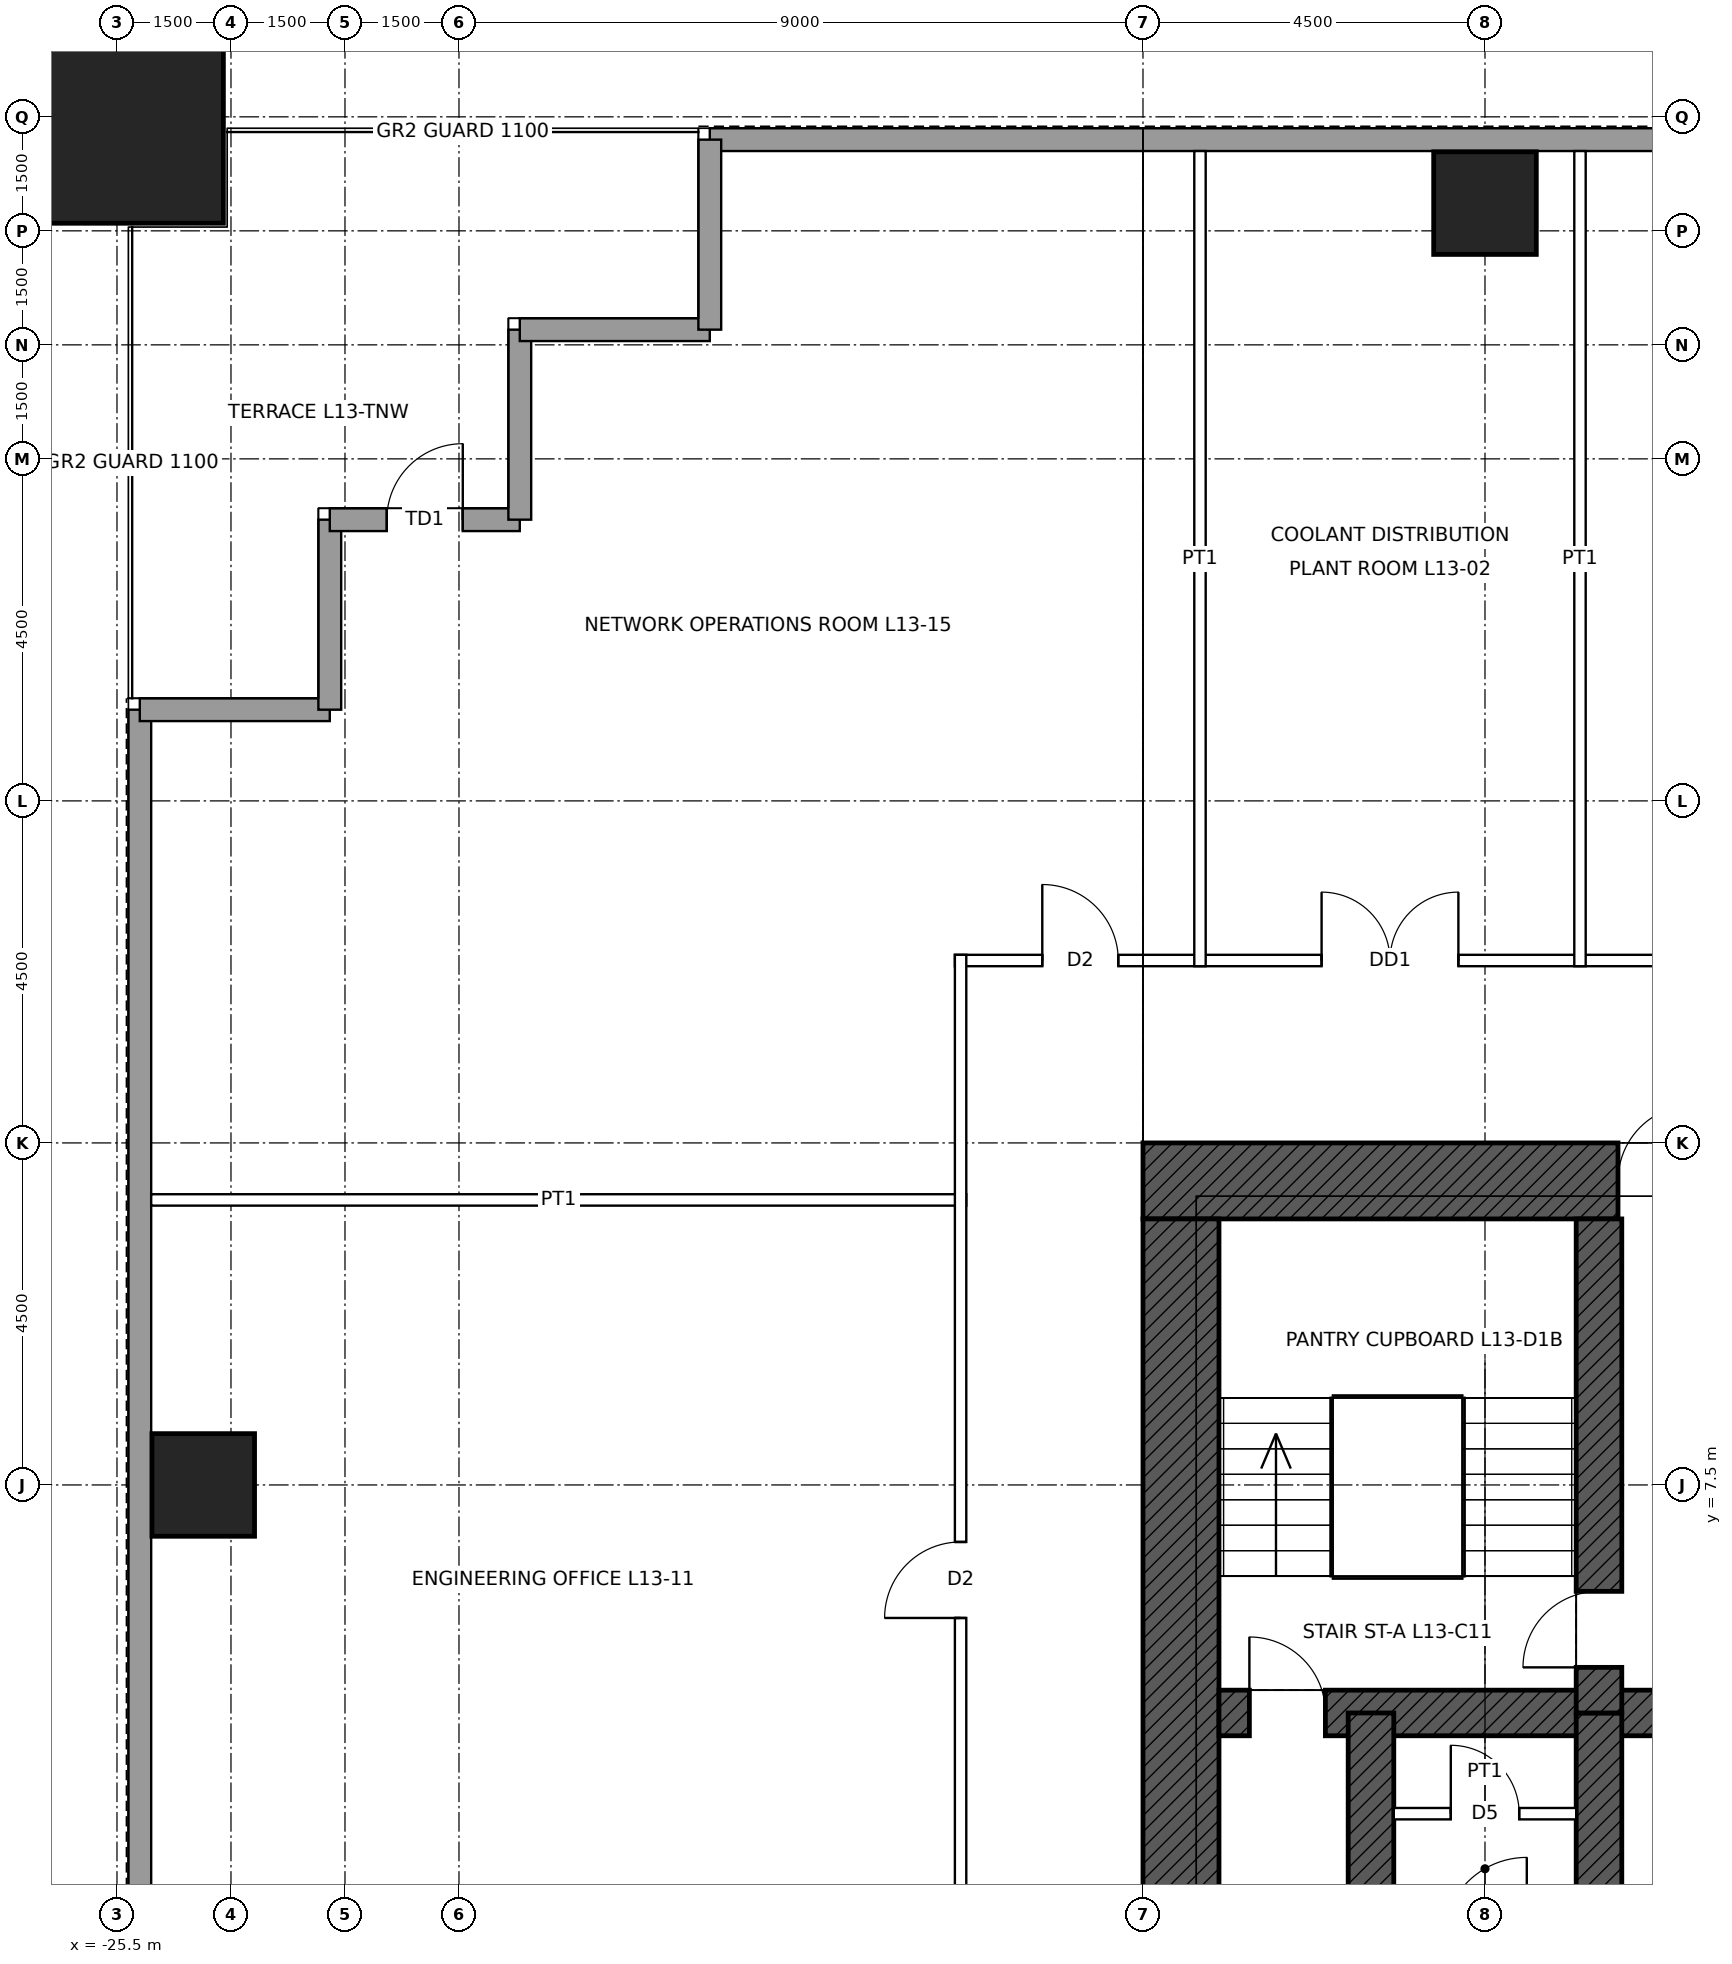
"""IFC4 building model, lengths in metres.
Left out: names, types, materials, properties, quantities, classifications, styles, units other than length and angle.
Written with IfcOpenShell. Run it as: python <this file> out.ifc"""

import sys

from ifc_helpers import new_model, si_unit, direction, frame, frame_2d, origin, origin_2d, place, context, subcontext, project, spatial, rectangle, hollow_rectangle, extrude, element, fill, save


model = new_model("IFC4")
c1 = context("Model", 3, precision=1e-05, world=origin(), true_north=direction((0.0, 1.0)))
c2 = subcontext(c1, "Body", "Model", "MODEL_VIEW")
j1 = project(units=[si_unit("LENGTHUNIT", "METRE"), si_unit("PLANEANGLEUNIT", "RADIAN")], contexts=[c1])
p1 = place(None, origin())
s1 = spatial("IfcSite", under=j1, at=p1, CompositionType="ELEMENT")
p2 = place(p1, origin())
s2 = spatial("IfcBuilding", under=s1, at=p2, CompositionType="ELEMENT")
p3 = place(p2, frame((0.0, 0.0, 68.4)))
s3 = spatial("IfcBuildingStorey", under=s2, at=p3, CompositionType="ELEMENT", Elevation=68.4)
p4 = place(p3, frame((-25.5, 25.5, 0.0), z_axis=(0.0, 0.0, 1.0), x_axis=(1.0, 0.0, 0.0)))
e1 = element("IfcColumn", 1, at=p4, inside=s3, PredefinedType="COLUMN", context=c2, shape_type="SweptSolid", body=[
    extrude(hollow_rectangle(XDim=2.8, YDim=2.8, WallThickness=0.14, at=origin_2d()), origin(), (0.0, 0.0, 1.0), 5.0),
])
for number, where, z_axis, x_axis in (
    (2, (-7.5, 24.365, 0.0), (0.0, 0.0, 1.0), (1.0, 0.0, 0.0)),
    (3, (-24.365, 7.5, 0.0), (0.0, 0.0, 1.0), (1.0, 0.0, 0.0)),
):
    element("IfcColumn", number, at=place(p3, frame(where, z_axis=z_axis, x_axis=x_axis)), inside=s3, PredefinedType="COLUMN", context=c2, shape_type="SweptSolid", body=[
        extrude(hollow_rectangle(XDim=1.35, YDim=1.35, WallThickness=0.085, at=origin_2d()), origin(), (0.0, 0.0, 1.0), 5.0),
    ])
p5 = place(p3, frame((-12.0, 11.5, 0.0), z_axis=(0.0, 0.0, 1.0), x_axis=(1.0, 0.0, 0.0)))
e4 = element("IfcWall", 4, at=p5, inside=s3, PredefinedType="SHEAR", context=c2, shape_type="SweptSolid", body=[
    extrude(rectangle(XDim=24.0, YDim=1.0, at=frame_2d((12.0, 0.0))), origin(), (0.0, 0.0, 1.0), 5.0),
])
p6 = place(p5, frame((6.25, 0.0, 0.0)))
e5 = element("IfcOpeningElement", 5, at=p6, cuts=e4, PredefinedType="OPENING", context=c2, shape_type="SweptSolid", body=[
    extrude(rectangle(XDim=1.0, YDim=2.4, at=frame_2d((0.5, 1.2))), frame((0.0, 0.51, 0.0), z_axis=(0.0, -1.0, 0.0), x_axis=(1.0, 0.0, 0.0)), (0.0, 0.0, 1.0), 1.02),
])
p7 = place(p5, frame((16.75, 0.0, 0.0)))
e6 = element("IfcOpeningElement", 6, at=p7, cuts=e4, PredefinedType="OPENING", context=c2, shape_type="SweptSolid", body=[
    extrude(rectangle(XDim=1.0, YDim=2.4, at=frame_2d((0.5, 1.2))), frame((0.0, 0.51, 0.0), z_axis=(0.0, -1.0, 0.0), x_axis=(1.0, 0.0, 0.0)), (0.0, 0.0, 1.0), 1.02),
])
p8 = place(p3, frame((-11.5, -11.0, 0.0), z_axis=(0.0, 0.0, 1.0), x_axis=(0.0, 1.0, 0.0)))
e7 = element("IfcWall", 7, at=p8, inside=s3, PredefinedType="SHEAR", context=c2, shape_type="SweptSolid", body=[
    extrude(rectangle(XDim=22.0, YDim=1.0, at=frame_2d((11.0, 0.0))), origin(), (0.0, 0.0, 1.0), 5.0),
])
p9 = place(p8, frame((10.5, 0.0, 0.0)))
e8 = element("IfcOpeningElement", 8, at=p9, cuts=e7, PredefinedType="OPENING", context=c2, shape_type="SweptSolid", body=[
    extrude(rectangle(XDim=1.0, YDim=2.4, at=frame_2d((0.5, 1.2))), frame((0.0, 0.51, 0.0), z_axis=(0.0, -1.0, 0.0), x_axis=(1.0, 0.0, 0.0)), (0.0, 0.0, 1.0), 1.02),
])
p10 = place(p3, frame((-11.0, 4.5, 0.0), z_axis=(0.0, 0.0, 1.0), x_axis=(1.0, 0.0, 0.0)))
e9 = element("IfcWall", 9, at=p10, inside=s3, PredefinedType="SHEAR", context=c2, shape_type="SweptSolid", body=[
    extrude(rectangle(XDim=22.0, YDim=0.6, at=frame_2d((11.0, 0.0))), origin(), (0.0, 0.0, 1.0), 5.0),
])
p11 = place(p10, frame((0.4, 0.0, 0.0)))
e10 = element("IfcOpeningElement", 10, at=p11, cuts=e9, PredefinedType="OPENING", context=c2, shape_type="SweptSolid", body=[
    extrude(rectangle(XDim=1.0, YDim=2.1, at=frame_2d((0.5, 1.05))), frame((0.0, 0.31, 0.0), z_axis=(0.0, -1.0, 0.0), x_axis=(1.0, 0.0, 0.0)), (0.0, 0.0, 1.0), 0.62),
])
p12 = place(p10, frame((20.6, 0.0, 0.0)))
e11 = element("IfcOpeningElement", 11, at=p12, cuts=e9, PredefinedType="OPENING", context=c2, shape_type="SweptSolid", body=[
    extrude(rectangle(XDim=1.0, YDim=2.1, at=frame_2d((0.5, 1.05))), frame((0.0, 0.31, 0.0), z_axis=(0.0, -1.0, 0.0), x_axis=(1.0, 0.0, 0.0)), (0.0, 0.0, 1.0), 0.62),
])
for number, where, z_axis, x_axis in (
    (12, (-9.0, 1.5, 0.0), (0.0, 0.0, 1.0), (0.0, 1.0, 0.0)),
    (13, (-6.0, 1.5, 0.0), (0.0, 0.0, 1.0), (0.0, 1.0, 0.0)),
):
    element("IfcWall", number, at=place(p3, frame(where, z_axis=z_axis, x_axis=x_axis)), inside=s3, PredefinedType="SHEAR", context=c2, shape_type="SweptSolid", body=[
        extrude(rectangle(XDim=3.0, YDim=0.6, at=frame_2d((1.5, 0.0))), origin(), (0.0, 0.0, 1.0), 5.0),
    ])
p13 = place(p3, frame((-6.0, 4.5, 0.0), z_axis=(0.0, 0.0, 1.0), x_axis=(0.0, 1.0, 0.0)))
e14 = element("IfcWall", 14, at=p13, inside=s3, PredefinedType="SHEAR", context=c2, shape_type="SweptSolid", body=[
    extrude(rectangle(XDim=6.5, YDim=0.6, at=frame_2d((3.25, 0.0))), origin(), (0.0, 0.0, 1.0), 5.0),
])
p14 = place(p13, frame((0.6, 0.0, 0.0)))
e15 = element("IfcOpeningElement", 15, at=p14, cuts=e14, PredefinedType="OPENING", context=c2, shape_type="SweptSolid", body=[
    extrude(rectangle(XDim=1.0, YDim=2.1, at=frame_2d((0.5, 1.05))), frame((0.0, 0.31, 0.0), z_axis=(0.0, -1.0, 0.0), x_axis=(1.0, 0.0, 0.0)), (0.0, 0.0, 1.0), 0.62),
])
for number, where, z_axis, x_axis in (
    (16, (-17.7, 25.2, 0.0), (0.0, 0.0, 1.0), (1.0, 0.0, 0.0)),
    (17, (-25.2, -17.7, 0.0), (0.0, 0.0, 1.0), (0.0, 1.0, 0.0)),
):
    element("IfcWall", number, at=place(p3, frame(where, z_axis=z_axis, x_axis=x_axis)), inside=s3, PredefinedType="SOLIDWALL", context=c2, shape_type="SweptSolid", body=[
        extrude(rectangle(XDim=35.4, YDim=0.3, at=frame_2d((17.7, 0.0))), origin(), (0.0, 0.0, 1.0), 4.8),
    ])
for number, where, z_axis, x_axis in (
    (18, (-25.2, 17.7, 0.0), (0.0, 0.0, 1.0), (1.0, 0.0, 0.0)),
    (19, (-22.7, 17.7, 0.0), (0.0, 0.0, 1.0), (0.0, 1.0, 0.0)),
):
    element("IfcWall", number, at=place(p3, frame(where, z_axis=z_axis, x_axis=x_axis)), inside=s3, PredefinedType="SOLIDWALL", context=c2, shape_type="SweptSolid", body=[
        extrude(rectangle(XDim=2.5, YDim=0.3, at=frame_2d((1.25, 0.0))), origin(), (0.0, 0.0, 1.0), 4.8),
    ])
p15 = place(p3, frame((-22.7, 20.2, 0.0), z_axis=(0.0, 0.0, 1.0), x_axis=(1.0, 0.0, 0.0)))
e20 = element("IfcWall", 20, at=p15, inside=s3, PredefinedType="SOLIDWALL", context=c2, shape_type="SweptSolid", body=[
    extrude(rectangle(XDim=2.5, YDim=0.3, at=frame_2d((1.25, 0.0))), origin(), (0.0, 0.0, 1.0), 4.8),
])
p16 = place(p15, frame((0.75, 0.0, 0.0)))
e21 = element("IfcOpeningElement", 21, at=p16, cuts=e20, PredefinedType="OPENING", context=c2, shape_type="SweptSolid", body=[
    extrude(rectangle(XDim=1.0, YDim=2.4, at=frame_2d((0.5, 1.2))), frame((0.0, 0.16, 0.0), z_axis=(0.0, -1.0, 0.0), x_axis=(1.0, 0.0, 0.0)), (0.0, 0.0, 1.0), 0.32),
])
for number, where, z_axis, x_axis in (
    (22, (-20.2, 20.2, 0.0), (0.0, 0.0, 1.0), (0.0, 1.0, 0.0)),
    (23, (-20.2, 22.7, 0.0), (0.0, 0.0, 1.0), (1.0, 0.0, 0.0)),
    (24, (-17.7, 22.7, 0.0), (0.0, 0.0, 1.0), (0.0, 1.0, 0.0)),
):
    element("IfcWall", number, at=place(p3, frame(where, z_axis=z_axis, x_axis=x_axis)), inside=s3, PredefinedType="SOLIDWALL", context=c2, shape_type="SweptSolid", body=[
        extrude(rectangle(XDim=2.5, YDim=0.3, at=frame_2d((1.25, 0.0))), origin(), (0.0, 0.0, 1.0), 4.8),
    ])
p17 = place(p3, frame((-25.05, 11.25, 0.0), z_axis=(0.0, 0.0, 1.0), x_axis=(1.0, 0.0, 0.0)))
e25 = element("IfcWall", 25, at=p17, inside=s3, PredefinedType="PARTITIONING", context=c2, shape_type="SweptSolid", body=[
    extrude(rectangle(XDim=10.725, YDim=0.15, at=frame_2d((5.363, 0.0))), origin(), (0.0, 0.0, 1.0), 3.853),
])
p18 = place(p3, frame((-14.475, 14.4, 0.0), z_axis=(0.0, 0.0, 1.0), x_axis=(1.0, 0.0, 0.0)))
e26 = element("IfcWall", 26, at=p18, inside=s3, PredefinedType="PARTITIONING", context=c2, shape_type="SweptSolid", body=[
    extrude(rectangle(XDim=28.95, YDim=0.15, at=frame_2d((14.475, 0.0))), origin(), (0.0, 0.0, 1.0), 4.8),
])
p19 = place(p18, frame((4.825, 0.0, 0.0)))
e27 = element("IfcOpeningElement", 27, at=p19, cuts=e26, PredefinedType="OPENING", context=c2, shape_type="SweptSolid", body=[
    extrude(rectangle(XDim=1.8, YDim=2.4, at=frame_2d((0.9, 1.2))), frame((0.0, 0.085, 0.0), z_axis=(0.0, -1.0, 0.0), x_axis=(1.0, 0.0, 0.0)), (0.0, 0.0, 1.0), 0.17),
])
p20 = place(p18, frame((13.575, 0.0, 0.0)))
e28 = element("IfcOpeningElement", 28, at=p20, cuts=e26, PredefinedType="OPENING", context=c2, shape_type="SweptSolid", body=[
    extrude(rectangle(XDim=1.8, YDim=2.4, at=frame_2d((0.9, 1.2))), frame((0.0, 0.085, 0.0), z_axis=(0.0, -1.0, 0.0), x_axis=(1.0, 0.0, 0.0)), (0.0, 0.0, 1.0), 0.17),
])
p21 = place(p18, frame((22.725, 0.0, 0.0)))
e29 = element("IfcOpeningElement", 29, at=p21, cuts=e26, PredefinedType="OPENING", context=c2, shape_type="SweptSolid", body=[
    extrude(rectangle(XDim=1.0, YDim=2.1, at=frame_2d((0.5, 1.05))), frame((0.0, 0.085, 0.0), z_axis=(0.0, -1.0, 0.0), x_axis=(1.0, 0.0, 0.0)), (0.0, 0.0, 1.0), 0.17),
])
p22 = place(p18, frame((26.8, 0.0, 0.0)))
e30 = element("IfcOpeningElement", 30, at=p22, cuts=e26, PredefinedType="OPENING", context=c2, shape_type="SweptSolid", body=[
    extrude(rectangle(XDim=1.0, YDim=2.1, at=frame_2d((0.5, 1.05))), frame((0.0, 0.085, 0.0), z_axis=(0.0, -1.0, 0.0), x_axis=(1.0, 0.0, 0.0)), (0.0, 0.0, 1.0), 0.17),
])
p23 = place(p18, frame((1.15, 0.0, 0.0)))
e31 = element("IfcOpeningElement", 31, at=p23, cuts=e26, PredefinedType="OPENING", context=c2, shape_type="SweptSolid", body=[
    extrude(rectangle(XDim=1.0, YDim=2.1, at=frame_2d((0.5, 1.05))), frame((0.0, 0.085, 0.0), z_axis=(0.0, -1.0, 0.0), x_axis=(1.0, 0.0, 0.0)), (0.0, 0.0, 1.0), 0.17),
])
p24 = place(p3, frame((-14.4, -14.475, 0.0), z_axis=(0.0, 0.0, 1.0), x_axis=(0.0, 1.0, 0.0)))
e32 = element("IfcWall", 32, at=p24, inside=s3, PredefinedType="PARTITIONING", context=c2, shape_type="SweptSolid", body=[
    extrude(rectangle(XDim=28.95, YDim=0.15, at=frame_2d((14.475, 0.0))), origin(), (0.0, 0.0, 1.0), 4.8),
])
p25 = place(p24, frame((4.825, 0.0, 0.0)))
e33 = element("IfcOpeningElement", 33, at=p25, cuts=e32, PredefinedType="OPENING", context=c2, shape_type="SweptSolid", body=[
    extrude(rectangle(XDim=1.8, YDim=2.4, at=frame_2d((0.9, 1.2))), frame((0.0, 0.085, 0.0), z_axis=(0.0, -1.0, 0.0), x_axis=(1.0, 0.0, 0.0)), (0.0, 0.0, 1.0), 0.17),
])
p26 = place(p24, frame((11.075, 0.0, 0.0)))
e34 = element("IfcOpeningElement", 34, at=p26, cuts=e32, PredefinedType="OPENING", context=c2, shape_type="SweptSolid", body=[
    extrude(rectangle(XDim=1.8, YDim=2.4, at=frame_2d((0.9, 1.2))), frame((0.0, 0.085, 0.0), z_axis=(0.0, -1.0, 0.0), x_axis=(1.0, 0.0, 0.0)), (0.0, 0.0, 1.0), 0.17),
])
p27 = place(p24, frame((20.225, 0.0, 0.0)))
e35 = element("IfcOpeningElement", 35, at=p27, cuts=e32, PredefinedType="OPENING", context=c2, shape_type="SweptSolid", body=[
    extrude(rectangle(XDim=1.0, YDim=2.1, at=frame_2d((0.5, 1.05))), frame((0.0, 0.085, 0.0), z_axis=(0.0, -1.0, 0.0), x_axis=(1.0, 0.0, 0.0)), (0.0, 0.0, 1.0), 0.17),
])
p28 = place(p3, frame((-11.25, 14.325, 0.0), z_axis=(0.0, 0.0, 1.0), x_axis=(0.0, 1.0, 0.0)))
e36 = element("IfcWall", 36, at=p28, inside=s3, PredefinedType="PARTITIONING", context=c2, shape_type="SweptSolid", body=[
    extrude(rectangle(XDim=10.725, YDim=0.15, at=frame_2d((5.363, 0.0))), origin(), (0.0, 0.0, 1.0), 3.853),
])
p29 = place(p3, frame((-6.25, 14.325, 0.0), z_axis=(0.0, 0.0, 1.0), x_axis=(0.0, 1.0, 0.0)))
e37 = element("IfcWall", 37, at=p29, inside=s3, PredefinedType="PARTITIONING", context=c2, shape_type="SweptSolid", body=[
    extrude(rectangle(XDim=10.725, YDim=0.15, at=frame_2d((5.363, 0.0))), origin(), (0.0, 0.0, 1.0), 4.8),
])
p30 = place(p3, frame((-8.7, 3.175, 0.0), z_axis=(0.0, 0.0, 1.0), x_axis=(1.0, 0.0, 0.0)))
e38 = element("IfcWall", 38, at=p30, inside=s3, PredefinedType="PARTITIONING", context=c2, shape_type="SweptSolid", body=[
    extrude(rectangle(XDim=2.4, YDim=0.15, at=frame_2d((1.2, 0.0))), origin(), (0.0, 0.0, 1.0), 4.75),
])
p31 = place(p30, frame((0.75, 0.0, 0.0)))
e39 = element("IfcOpeningElement", 39, at=p31, cuts=e38, PredefinedType="OPENING", context=c2, shape_type="SweptSolid", body=[
    extrude(rectangle(XDim=0.9, YDim=2.1, at=frame_2d((0.45, 1.05))), frame((0.0, 0.085, 0.0), z_axis=(0.0, -1.0, 0.0), x_axis=(1.0, 0.0, 0.0)), (0.0, 0.0, 1.0), 0.17),
])
p32 = place(p16, origin())
e40 = element("IfcDoor", 40, at=p32, inside=s3, OperationType="SINGLE_SWING_RIGHT", PredefinedType="DOOR", context=c2, shape_type="SweptSolid", body=[
    extrude(rectangle(XDim=1.0, YDim=2.4, at=frame_2d((0.5, 1.2))), frame((0.0, 0.025, 0.0), z_axis=(0.0, -1.0, 0.0), x_axis=(1.0, 0.0, 0.0)), (0.0, 0.0, 1.0), 0.05),
])
fill(e21, e40)
p33 = place(p11, origin())
e41 = element("IfcDoor", 41, at=p33, inside=s3, OperationType="SINGLE_SWING_LEFT", PredefinedType="DOOR", context=c2, shape_type="SweptSolid", body=[
    extrude(rectangle(XDim=1.0, YDim=2.1, at=frame_2d((0.5, 1.05))), frame((0.0, 0.025, 0.0), z_axis=(0.0, -1.0, 0.0), x_axis=(1.0, 0.0, 0.0)), (0.0, 0.0, 1.0), 0.05),
])
fill(e10, e41)
p34 = place(p14, origin())
e42 = element("IfcDoor", 42, at=p34, inside=s3, OperationType="SINGLE_SWING_LEFT", PredefinedType="DOOR", context=c2, shape_type="SweptSolid", body=[
    extrude(rectangle(XDim=1.0, YDim=2.1, at=frame_2d((0.5, 1.05))), frame((0.0, 0.025, 0.0), z_axis=(0.0, -1.0, 0.0), x_axis=(1.0, 0.0, 0.0)), (0.0, 0.0, 1.0), 0.05),
])
fill(e15, e42)
p35 = place(p6, origin())
e43 = element("IfcDoor", 43, at=p35, inside=s3, OperationType="SINGLE_SWING_RIGHT", PredefinedType="DOOR", context=c2, shape_type="SweptSolid", body=[
    extrude(rectangle(XDim=1.0, YDim=2.4, at=frame_2d((0.5, 1.2))), frame((0.0, 0.485, 0.0), z_axis=(0.0, -1.0, 0.0), x_axis=(1.0, 0.0, 0.0)), (0.0, 0.0, 1.0), 0.05),
])
fill(e5, e43)
p36 = place(p31, origin())
e44 = element("IfcDoor", 44, at=p36, inside=s3, OperationType="SINGLE_SWING_LEFT", PredefinedType="DOOR", context=c2, shape_type="SweptSolid", body=[
    extrude(rectangle(XDim=0.9, YDim=2.1, at=frame_2d((0.45, 1.05))), frame((0.0, 0.025, 0.0), z_axis=(0.0, -1.0, 0.0), x_axis=(1.0, 0.0, 0.0)), (0.0, 0.0, 1.0), 0.05),
])
fill(e39, e44)
p37 = place(p19, origin())
e45 = element("IfcDoor", 45, at=p37, inside=s3, OperationType="DOUBLE_DOOR_SINGLE_SWING", PredefinedType="DOOR", context=c2, shape_type="SweptSolid", body=[
    extrude(rectangle(XDim=1.8, YDim=2.4, at=frame_2d((0.9, 1.2))), frame((0.0, 0.025, 0.0), z_axis=(0.0, -1.0, 0.0), x_axis=(1.0, 0.0, 0.0)), (0.0, 0.0, 1.0), 0.05),
])
fill(e27, e45)
p38 = place(p27, origin())
e46 = element("IfcDoor", 46, at=p38, inside=s3, OperationType="SINGLE_SWING_LEFT", PredefinedType="DOOR", context=c2, shape_type="SweptSolid", body=[
    extrude(rectangle(XDim=1.0, YDim=2.1, at=frame_2d((0.5, 1.05))), frame((0.0, 0.025, 0.0), z_axis=(0.0, -1.0, 0.0), x_axis=(1.0, 0.0, 0.0)), (0.0, 0.0, 1.0), 0.05),
])
fill(e35, e46)
p39 = place(p23, origin())
e47 = element("IfcDoor", 47, at=p39, inside=s3, OperationType="SINGLE_SWING_LEFT", PredefinedType="DOOR", context=c2, shape_type="SweptSolid", body=[
    extrude(rectangle(XDim=1.0, YDim=2.1, at=frame_2d((0.5, 1.05))), frame((0.0, 0.025, 0.0), z_axis=(0.0, -1.0, 0.0), x_axis=(1.0, 0.0, 0.0)), (0.0, 0.0, 1.0), 0.05),
])
fill(e31, e47)
save(model, sys.argv[1])
